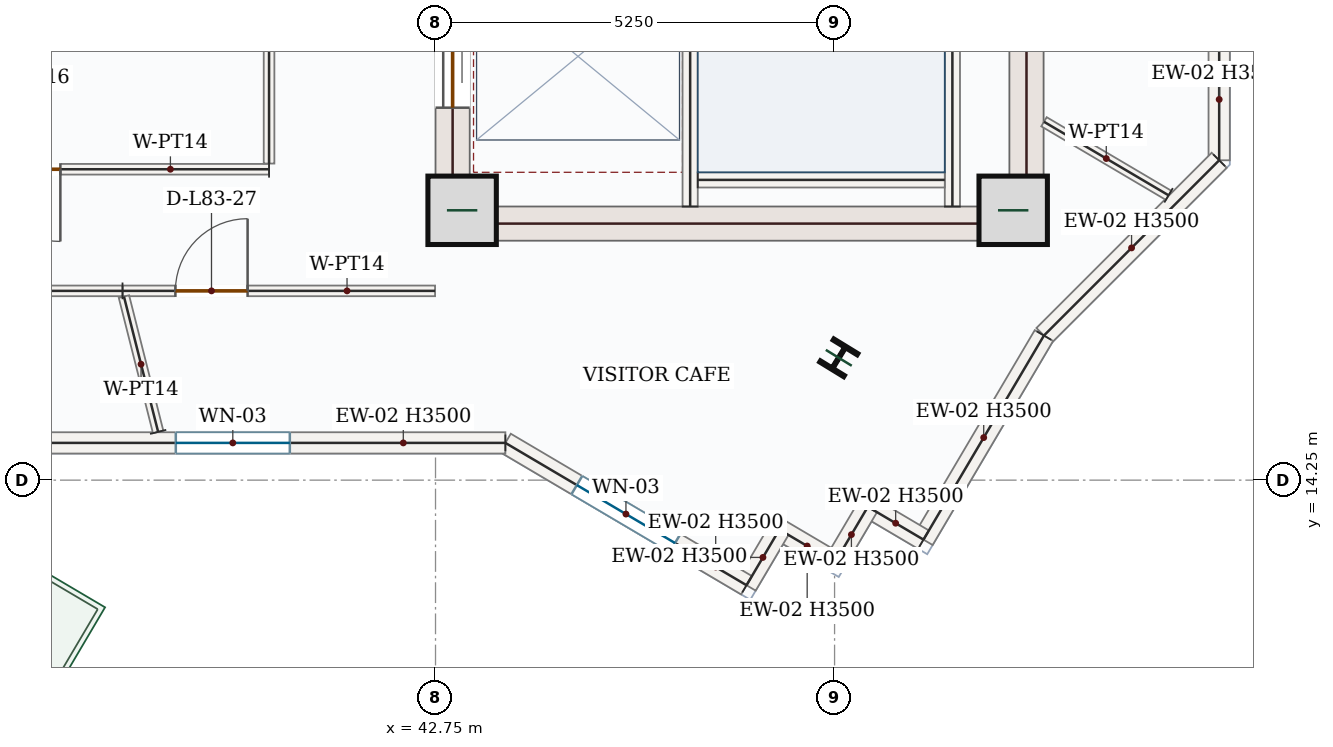
"""IFC4 building model, lengths in metres.
Left out: names, types, materials, properties, quantities, classifications, styles, units other than length and angle.
Written with IfcOpenShell. Run it as: python <this file> out.ifc"""

import sys

from ifc_helpers import new_model, si_unit, direction, frame, frame_2d, origin, origin_2d, place, context, subcontext, project, spatial, rectangle, i_section, extrude, source, transform, mapped, element, fill, save


model = new_model("IFC4")
c1 = context("Model", 3, precision=1e-05, world=origin(), true_north=direction((0.0, 1.0)))
c2 = subcontext(c1, "Body", "Model", "MODEL_VIEW")
j1 = project(units=[si_unit("LENGTHUNIT", "METRE"), si_unit("PLANEANGLEUNIT", "RADIAN")], contexts=[c1])
p1 = place(None, origin())
s1 = spatial("IfcSite", under=j1, at=p1, CompositionType="ELEMENT")
p2 = place(p1, origin())
s2 = spatial("IfcBuilding", under=s1, at=p2, CompositionType="ELEMENT")
p3 = place(p2, frame((0.0, 0.0, 342.3)))
s3 = spatial("IfcBuildingStorey", under=s2, at=p3, CompositionType="ELEMENT", Elevation=342.3)
p4 = place(p3, frame((42.975, 17.4, 0.0), z_axis=(0.0, 0.0, 1.0), x_axis=(0.0, 1.0, 0.0)))
e1 = element("IfcWall", 1, at=p4, inside=s3, PredefinedType="SHEAR", context=c2, shape_type="SweptSolid", body=[
    extrude(rectangle(XDim=8.55, YDim=0.45, at=frame_2d((4.275, 0.0))), origin(), (0.0, 0.0, 1.0), 3.5),
])
p5 = place(p4, frame((6.65, 0.0, 0.0)))
e2 = element("IfcOpeningElement", 2, at=p5, cuts=e1, PredefinedType="OPENING", context=c2, shape_type="SweptSolid", body=[
    extrude(rectangle(XDim=1.1, YDim=2.2, at=frame_2d((0.55, 1.1))), frame((0.0, 0.235, 0.0), z_axis=(0.0, -1.0, 0.0), x_axis=(1.0, 0.0, 0.0)), (0.0, 0.0, 1.0), 0.47),
])
p6 = place(p4, frame((1.75, 0.0, 0.0)))
e3 = element("IfcOpeningElement", 3, at=p6, cuts=e1, PredefinedType="OPENING", context=c2, shape_type="SweptSolid", body=[
    extrude(rectangle(XDim=1.3, YDim=2.2, at=frame_2d((0.65, 1.1))), frame((0.0, 0.235, 0.0), z_axis=(0.0, -1.0, 0.0), x_axis=(1.0, 0.0, 0.0)), (0.0, 0.0, 1.0), 0.47),
])
p7 = place(p4, frame((4.3, 0.0, 0.0)))
e4 = element("IfcOpeningElement", 4, at=p7, cuts=e1, PredefinedType="OPENING", context=c2, shape_type="SweptSolid", body=[
    extrude(rectangle(XDim=0.88, YDim=2.1, at=frame_2d((0.44, 1.05))), frame((0.0, 0.235, 0.0), z_axis=(0.0, -1.0, 0.0), x_axis=(1.0, 0.0, 0.0)), (0.0, 0.0, 1.0), 0.47),
])
m1 = source(origin(), c2, "Body", "SweptSolid", [
    extrude(rectangle(XDim=8.55, YDim=0.45, at=frame_2d((4.275, 0.0))), origin(), (0.0, 0.0, 1.0), 3.5),
])
p8 = place(p3, frame((50.525, 17.4, 0.0), z_axis=(0.0, 0.0, 1.0), x_axis=(0.0, 1.0, 0.0)))
e5 = element("IfcWall", 5, at=p8, inside=s3, PredefinedType="SHEAR", context=c2, shape_type="MappedRepresentation", body=[
    mapped(m1, transform((0.0, 0.0, 0.0), x_axis=(1.0, 0.0, 0.0), y_axis=(0.0, 1.0, 0.0), z_axis=(0.0, 0.0, 1.0), scale=1.0)),
])
m2 = source(origin(), c2, "Body", "SweptSolid", [
    extrude(rectangle(XDim=7.1, YDim=0.45, at=frame_2d((3.55, 0.0))), origin(), (0.0, 0.0, 1.0), 3.5),
])
p9 = place(p3, frame((43.2, 17.625, 0.0), z_axis=(0.0, 0.0, 1.0), x_axis=(1.0, 0.0, 0.0)))
e6 = element("IfcWall", 6, at=p9, inside=s3, PredefinedType="SHEAR", context=c2, shape_type="MappedRepresentation", body=[
    mapped(m2, transform((0.0, 0.0, 0.0), x_axis=(1.0, 0.0, 0.0), y_axis=(0.0, 1.0, 0.0), z_axis=(0.0, 0.0, 1.0), scale=1.0)),
])
m3 = source(origin(), c2, "Body", "SweptSolid", [
    extrude(rectangle(XDim=0.9, YDim=0.9, at=origin_2d()), origin(), (0.0, 0.0, 1.0), 3.75),
])
for number, where, z_axis, x_axis in (
    (7, (43.1, 17.8, 0.0), (0.0, 0.0, 1.0), (1.0, 0.0, 0.0)),
    (8, (50.35, 17.8, 0.0), (0.0, 0.0, 1.0), (1.0, 0.0, 0.0)),
):
    element("IfcColumn", number, at=place(p3, frame(where, z_axis=z_axis, x_axis=x_axis)), inside=s3, PredefinedType="COLUMN", context=c2, shape_type="MappedRepresentation", body=[
        mapped(m3, transform((0.0, 0.0, 0.0), x_axis=(1.0, 0.0, 0.0), y_axis=(0.0, 1.0, 0.0), z_axis=(0.0, 0.0, 1.0), scale=1.0)),
    ])
m4 = source(origin(), c2, "Body", "SweptSolid", [
    extrude(i_section(OverallWidth=0.369, OverallDepth=0.356, WebThickness=0.011, FlangeThickness=0.018, FilletRadius=0.018, at=origin_2d()), origin(), (0.0, 0.0, 1.0), 3.75),
])
p10 = place(p3, frame((48.055, 15.859, 0.0), z_axis=(0.0, 0.0, 1.0), x_axis=(-0.852640164354, 0.522498564716, 0.0)))
e9 = element("IfcColumn", 9, at=p10, inside=s3, PredefinedType="COLUMN", context=c2, shape_type="MappedRepresentation", body=[
    mapped(m4, transform((0.0, 0.0, 0.0), x_axis=(1.0, 0.0, 0.0), y_axis=(0.0, 1.0, 0.0), z_axis=(0.0, 0.0, 1.0), scale=1.0)),
])
m5 = source(origin(), c2, "Body", "SweptSolid", [
    extrude(rectangle(XDim=1.601, YDim=0.28, at=frame_2d((0.8, 0.0))), origin(), (0.0, 0.0, 1.0), 3.5),
])
p11 = place(p3, frame((53.06, 20.059, 0.0), z_axis=(0.0, 0.0, 1.0), x_axis=(0.0, -1.0, 0.0)))
e10 = element("IfcWall", 10, at=p11, inside=s3, PredefinedType="SOLIDWALL", context=c2, shape_type="MappedRepresentation", body=[
    mapped(m5, transform((0.0, 0.0, 0.0), x_axis=(1.0, 0.0, 0.0), y_axis=(0.0, 1.0, 0.0), z_axis=(0.0, 0.0, 1.0), scale=1.0)),
])
m6 = source(origin(), c2, "Body", "SweptSolid", [
    extrude(rectangle(XDim=3.261, YDim=0.28, at=frame_2d((1.63, 0.0))), origin(), (0.0, 0.0, 1.0), 3.5),
])
p12 = place(p3, frame((53.06, 18.458, 0.0), z_axis=(0.0, 0.0, 1.0), x_axis=(-0.707106781187, -0.707106781187, 0.0)))
e11 = element("IfcWall", 11, at=p12, inside=s3, PredefinedType="SOLIDWALL", context=c2, shape_type="MappedRepresentation", body=[
    mapped(m6, transform((0.0, 0.0, 0.0), x_axis=(1.0, 0.0, 0.0), y_axis=(0.0, 1.0, 0.0), z_axis=(0.0, 0.0, 1.0), scale=1.0)),
])
m7 = source(origin(), c2, "Body", "SweptSolid", [
    extrude(rectangle(XDim=3.118, YDim=0.28, at=frame_2d((1.559, 0.0))), origin(), (0.0, 0.0, 1.0), 3.5),
])
p13 = place(p3, frame((50.754, 16.152, 0.0), z_axis=(0.0, 0.0, 1.0), x_axis=(-0.508275482209, -0.861194539106, 0.0)))
e12 = element("IfcWall", 12, at=p13, inside=s3, PredefinedType="SOLIDWALL", context=c2, shape_type="MappedRepresentation", body=[
    mapped(m7, transform((0.0, 0.0, 0.0), x_axis=(1.0, 0.0, 0.0), y_axis=(0.0, 1.0, 0.0), z_axis=(0.0, 0.0, 1.0), scale=1.0)),
])
m8 = source(origin(), c2, "Body", "SweptSolid", [
    extrude(rectangle(XDim=0.85, YDim=0.28, at=frame_2d((0.425, 0.0))), origin(), (0.0, 0.0, 1.0), 3.5),
])
for number, where, z_axis, x_axis in (
    (13, (49.17, 13.467, 0.0), (0.0, 0.0, 1.0), (-0.861, 0.508, 0.0)),
    (14, (48.438, 13.899, 0.0), (0.0, 0.0, 1.0), (-0.508, -0.861, 0.0)),
    (15, (48.006, 13.167, 0.0), (0.0, 0.0, 1.0), (-0.861, 0.508, 0.0)),
    (16, (47.274, 13.6, 0.0), (0.0, 0.0, 1.0), (-0.508, -0.861, 0.0)),
):
    element("IfcWall", number, at=place(p3, frame(where, z_axis=z_axis, x_axis=x_axis)), inside=s3, PredefinedType="SOLIDWALL", context=c2, shape_type="MappedRepresentation", body=[
        mapped(m8, transform((0.0, 0.0, 0.0), x_axis=(1.0, 0.0, 0.0), y_axis=(0.0, 1.0, 0.0), z_axis=(0.0, 0.0, 1.0), scale=1.0)),
    ])
p14 = place(p3, frame((46.842, 12.867, 0.0), z_axis=(0.0, 0.0, 1.0), x_axis=(-0.861166561994, 0.508322882137, 0.0)))
e17 = element("IfcWall", 17, at=p14, inside=s3, PredefinedType="SOLIDWALL", context=c2, shape_type="SweptSolid", body=[
    extrude(rectangle(XDim=3.684, YDim=0.28, at=frame_2d((1.842, 0.0))), origin(), (0.0, 0.0, 1.0), 3.5),
])
p15 = place(p14, frame((1.092, 0.0, 0.85)))
e18 = element("IfcOpeningElement", 18, at=p15, cuts=e17, PredefinedType="OPENING", context=c2, shape_type="SweptSolid", body=[
    extrude(rectangle(XDim=1.5, YDim=1.5, at=frame_2d((0.75, 0.75))), frame((0.0, 0.15, 0.0), z_axis=(0.0, -1.0, 0.0), x_axis=(1.0, 0.0, 0.0)), (0.0, 0.0, 1.0), 0.3),
])
p16 = place(p3, frame((43.669, 14.74, 0.0), z_axis=(0.0, 0.0, 1.0), x_axis=(-1.0, 0.0, 0.0)))
e19 = element("IfcWall", 19, at=p16, inside=s3, PredefinedType="SOLIDWALL", context=c2, shape_type="SweptSolid", body=[
    extrude(rectangle(XDim=7.172, YDim=0.28, at=frame_2d((3.586, 0.0))), origin(), (0.0, 0.0, 1.0), 3.5),
])
p17 = place(p16, frame((2.836, 0.0, 0.85)))
e20 = element("IfcOpeningElement", 20, at=p17, cuts=e19, PredefinedType="OPENING", context=c2, shape_type="SweptSolid", body=[
    extrude(rectangle(XDim=1.5, YDim=1.5, at=frame_2d((0.75, 0.75))), frame((0.0, 0.15, 0.0), z_axis=(0.0, -1.0, 0.0), x_axis=(1.0, 0.0, 0.0)), (0.0, 0.0, 1.0), 0.3),
])
m9 = source(origin(), c2, "Body", "SweptSolid", [
    extrude(rectangle(XDim=7.87, YDim=0.2, at=frame_2d((3.935, 0.0))), origin(), (0.0, 0.0, 1.0), 3.5),
])
p18 = place(p3, frame((49.55, 17.85, 0.0), z_axis=(0.0, 0.0, 1.0), x_axis=(0.0, 1.0, 0.0)))
e21 = element("IfcWall", 21, at=p18, inside=s3, PredefinedType="SOLIDWALL", context=c2, shape_type="MappedRepresentation", body=[
    mapped(m9, transform((0.0, 0.0, 0.0), x_axis=(1.0, 0.0, 0.0), y_axis=(0.0, 1.0, 0.0), z_axis=(0.0, 0.0, 1.0), scale=1.0)),
])
p19 = place(p3, frame((46.1, 17.85, 0.0), z_axis=(0.0, 0.0, 1.0), x_axis=(0.0, 1.0, 0.0)))
e22 = element("IfcWall", 22, at=p19, inside=s3, PredefinedType="SOLIDWALL", context=c2, shape_type="SweptSolid", body=[
    extrude(rectangle(XDim=8.0, YDim=0.2, at=frame_2d((4.0, 0.0))), origin(), (0.0, 0.0, 1.0), 3.5),
])
p20 = place(p19, frame((6.3, 0.0, 0.0)))
e23 = element("IfcOpeningElement", 23, at=p20, cuts=e22, PredefinedType="OPENING", context=c2, shape_type="SweptSolid", body=[
    extrude(rectangle(XDim=1.05, YDim=2.15, at=frame_2d((0.525, 1.075))), frame((0.0, 0.11, 0.0), z_axis=(0.0, -1.0, 0.0), x_axis=(1.0, 0.0, 0.0)), (0.0, 0.0, 1.0), 0.22),
])
m10 = source(origin(), c2, "Body", "SweptSolid", [
    extrude(rectangle(XDim=3.25, YDim=0.2, at=frame_2d((1.625, 0.0))), origin(), (0.0, 0.0, 1.0), 3.5),
])
p21 = place(p3, frame((46.2, 18.2, 0.0), z_axis=(0.0, 0.0, 1.0), x_axis=(1.0, 0.0, 0.0)))
e24 = element("IfcWall", 24, at=p21, inside=s3, PredefinedType="SOLIDWALL", context=c2, shape_type="MappedRepresentation", body=[
    mapped(m10, transform((0.0, 0.0, 0.0), x_axis=(1.0, 0.0, 0.0), y_axis=(0.0, 1.0, 0.0), z_axis=(0.0, 0.0, 1.0), scale=1.0)),
])
p22 = place(p3, frame((40.56, 18.34, 0.0), z_axis=(0.0, 0.0, 1.0), x_axis=(-1.0, 0.0, 0.0)))
e25 = element("IfcWall", 25, at=p22, inside=s3, PredefinedType="PARTITIONING", context=c2, shape_type="SweptSolid", body=[
    extrude(rectangle(XDim=4.47, YDim=0.14, at=frame_2d((2.235, 0.0))), origin(), (0.0, 0.0, 1.0), 3.5),
])
p23 = place(p22, frame((2.746, 0.0, 0.0)))
e26 = element("IfcOpeningElement", 26, at=p23, cuts=e25, PredefinedType="OPENING", context=c2, shape_type="SweptSolid", body=[
    extrude(rectangle(XDim=0.95, YDim=2.15, at=frame_2d((0.475, 1.075))), frame((0.0, 0.08, 0.0), z_axis=(0.0, -1.0, 0.0), x_axis=(1.0, 0.0, 0.0)), (0.0, 0.0, 1.0), 0.16),
])
m11 = source(origin(), c2, "Body", "SweptSolid", [
    extrude(rectangle(XDim=3.52, YDim=0.14, at=frame_2d((1.76, 0.0))), origin(), (0.0, 0.0, 1.0), 3.5),
])
p24 = place(p3, frame((40.56, 21.935, 0.0), z_axis=(0.0, 0.0, 1.0), x_axis=(0.0, -1.0, 0.0)))
e27 = element("IfcWall", 27, at=p24, inside=s3, PredefinedType="PARTITIONING", context=c2, shape_type="MappedRepresentation", body=[
    mapped(m11, transform((0.0, 0.0, 0.0), x_axis=(1.0, 0.0, 0.0), y_axis=(0.0, 1.0, 0.0), z_axis=(0.0, 0.0, 1.0), scale=1.0)),
])
m12 = source(origin(), c2, "Body", "SweptSolid", [
    extrude(rectangle(XDim=1.904, YDim=0.14, at=frame_2d((0.952, 0.0))), origin(), (0.0, 0.0, 1.0), 3.5),
])
p25 = place(p3, frame((52.394, 17.997, 0.0), z_axis=(0.0, 0.0, 1.0), x_axis=(-0.86120470185, 0.508258262611, 0.0)))
e28 = element("IfcWall", 28, at=p25, inside=s3, PredefinedType="PARTITIONING", context=c2, shape_type="MappedRepresentation", body=[
    mapped(m12, transform((0.0, 0.0, 0.0), x_axis=(1.0, 0.0, 0.0), y_axis=(0.0, 1.0, 0.0), z_axis=(0.0, 0.0, 1.0), scale=1.0)),
])
p26 = place(p3, frame((38.632, 16.74, 0.0), z_axis=(0.0, 0.0, 1.0), x_axis=(1.0, 0.0, 0.0)))
e29 = element("IfcWall", 29, at=p26, inside=s3, PredefinedType="PARTITIONING", context=c2, shape_type="SweptSolid", body=[
    extrude(rectangle(XDim=4.112, YDim=0.14, at=frame_2d((2.056, 0.0))), origin(), (0.0, 0.0, 1.0), 3.5),
])
p27 = place(p26, frame((0.696, 0.0, 0.0)))
e30 = element("IfcOpeningElement", 30, at=p27, cuts=e29, PredefinedType="OPENING", context=c2, shape_type="SweptSolid", body=[
    extrude(rectangle(XDim=0.95, YDim=2.15, at=frame_2d((0.475, 1.075))), frame((0.0, 0.08, 0.0), z_axis=(0.0, -1.0, 0.0), x_axis=(1.0, 0.0, 0.0)), (0.0, 0.0, 1.0), 0.16),
])
m13 = source(origin(), c2, "Body", "SweptSolid", [
    extrude(rectangle(XDim=1.836, YDim=0.14, at=frame_2d((0.918, 0.0))), origin(), (0.0, 0.0, 1.0), 3.5),
])
p28 = place(p3, frame((39.101, 14.885, 0.0), z_axis=(0.0, 0.0, 1.0), x_axis=(-0.24494411221, 0.96953719985, 0.0)))
e31 = element("IfcWall", 31, at=p28, inside=s3, PredefinedType="PARTITIONING", context=c2, shape_type="MappedRepresentation", body=[
    mapped(m13, transform((0.0, 0.0, 0.0), x_axis=(1.0, 0.0, 0.0), y_axis=(0.0, 1.0, 0.0), z_axis=(0.0, 0.0, 1.0), scale=1.0)),
])
p29 = place(p3, frame((30.618, 16.74, 0.0), z_axis=(0.0, 0.0, 1.0), x_axis=(1.0, 0.0, 0.0)))
e32 = element("IfcWall", 32, at=p29, inside=s3, PredefinedType="PARTITIONING", context=c2, shape_type="SweptSolid", body=[
    extrude(rectangle(XDim=8.014, YDim=0.14, at=frame_2d((4.007, 0.0))), origin(), (0.0, 0.0, 1.0), 3.5),
])
p30 = place(p29, frame((4.592, 0.0, 0.0)))
e33 = element("IfcOpeningElement", 33, at=p30, cuts=e32, PredefinedType="OPENING", context=c2, shape_type="SweptSolid", body=[
    extrude(rectangle(XDim=0.95, YDim=2.15, at=frame_2d((0.475, 1.075))), frame((0.0, 0.08, 0.0), z_axis=(0.0, -1.0, 0.0), x_axis=(1.0, 0.0, 0.0)), (0.0, 0.0, 1.0), 0.16),
])
m14 = source(origin(), c2, "Body", "SweptSolid", [
    extrude(rectangle(XDim=1.5, YDim=1.5, at=frame_2d((0.75, 0.75))), frame((0.0, 0.03, 0.0), z_axis=(0.0, -1.0, 0.0), x_axis=(1.0, 0.0, 0.0)), (0.0, 0.0, 1.0), 0.06),
])
p31 = place(p15, origin())
e34 = element("IfcWindow", 34, at=p31, inside=s3, PartitioningType="SINGLE_PANEL", PredefinedType="WINDOW", context=c2, shape_type="MappedRepresentation", body=[
    mapped(m14, transform((0.0, 0.0, 0.0), x_axis=(1.0, 0.0, 0.0), y_axis=(0.0, 1.0, 0.0), z_axis=(0.0, 0.0, 1.0), scale=1.0)),
])
fill(e18, e34)
p32 = place(p17, origin())
e35 = element("IfcWindow", 35, at=p32, inside=s3, PartitioningType="SINGLE_PANEL", PredefinedType="WINDOW", context=c2, shape_type="MappedRepresentation", body=[
    mapped(m14, transform((0.0, 0.0, 0.0), x_axis=(1.0, 0.0, 0.0), y_axis=(0.0, 1.0, 0.0), z_axis=(0.0, 0.0, 1.0), scale=1.0)),
])
fill(e20, e35)
m15 = source(origin(), c2, "Body", "SweptSolid", [
    extrude(rectangle(XDim=1.3, YDim=2.2, at=frame_2d((0.65, 1.1))), frame((0.0, 0.025, 0.0), z_axis=(0.0, -1.0, 0.0), x_axis=(1.0, 0.0, 0.0)), (0.0, 0.0, 1.0), 0.05),
])
p33 = place(p6, origin())
e36 = element("IfcDoor", 36, at=p33, inside=s3, OperationType="DOUBLE_DOOR_SLIDING", PredefinedType="DOOR", context=c2, shape_type="MappedRepresentation", body=[
    mapped(m15, transform((0.0, 0.0, 0.0), x_axis=(1.0, 0.0, 0.0), y_axis=(0.0, 1.0, 0.0), z_axis=(0.0, 0.0, 1.0), scale=1.0)),
])
fill(e3, e36)
m16 = source(origin(), c2, "Body", "SweptSolid", [
    extrude(rectangle(XDim=0.95, YDim=2.15, at=frame_2d((0.475, 1.075))), frame((0.0, 0.025, 0.0), z_axis=(0.0, -1.0, 0.0), x_axis=(1.0, 0.0, 0.0)), (0.0, 0.0, 1.0), 0.05),
])
p34 = place(p23, origin())
e37 = element("IfcDoor", 37, at=p34, inside=s3, OperationType="SINGLE_SWING_LEFT", PredefinedType="DOOR", context=c2, shape_type="MappedRepresentation", body=[
    mapped(m16, transform((0.0, 0.0, 0.0), x_axis=(1.0, 0.0, 0.0), y_axis=(0.0, 1.0, 0.0), z_axis=(0.0, 0.0, 1.0), scale=1.0)),
])
fill(e26, e37)
p35 = place(p27, origin())
e38 = element("IfcDoor", 38, at=p35, inside=s3, OperationType="SINGLE_SWING_RIGHT", PredefinedType="DOOR", context=c2, shape_type="MappedRepresentation", body=[
    mapped(m16, transform((0.0, 0.0, 0.0), x_axis=(1.0, 0.0, 0.0), y_axis=(0.0, 1.0, 0.0), z_axis=(0.0, 0.0, 1.0), scale=1.0)),
])
fill(e30, e38)
save(model, sys.argv[1])
